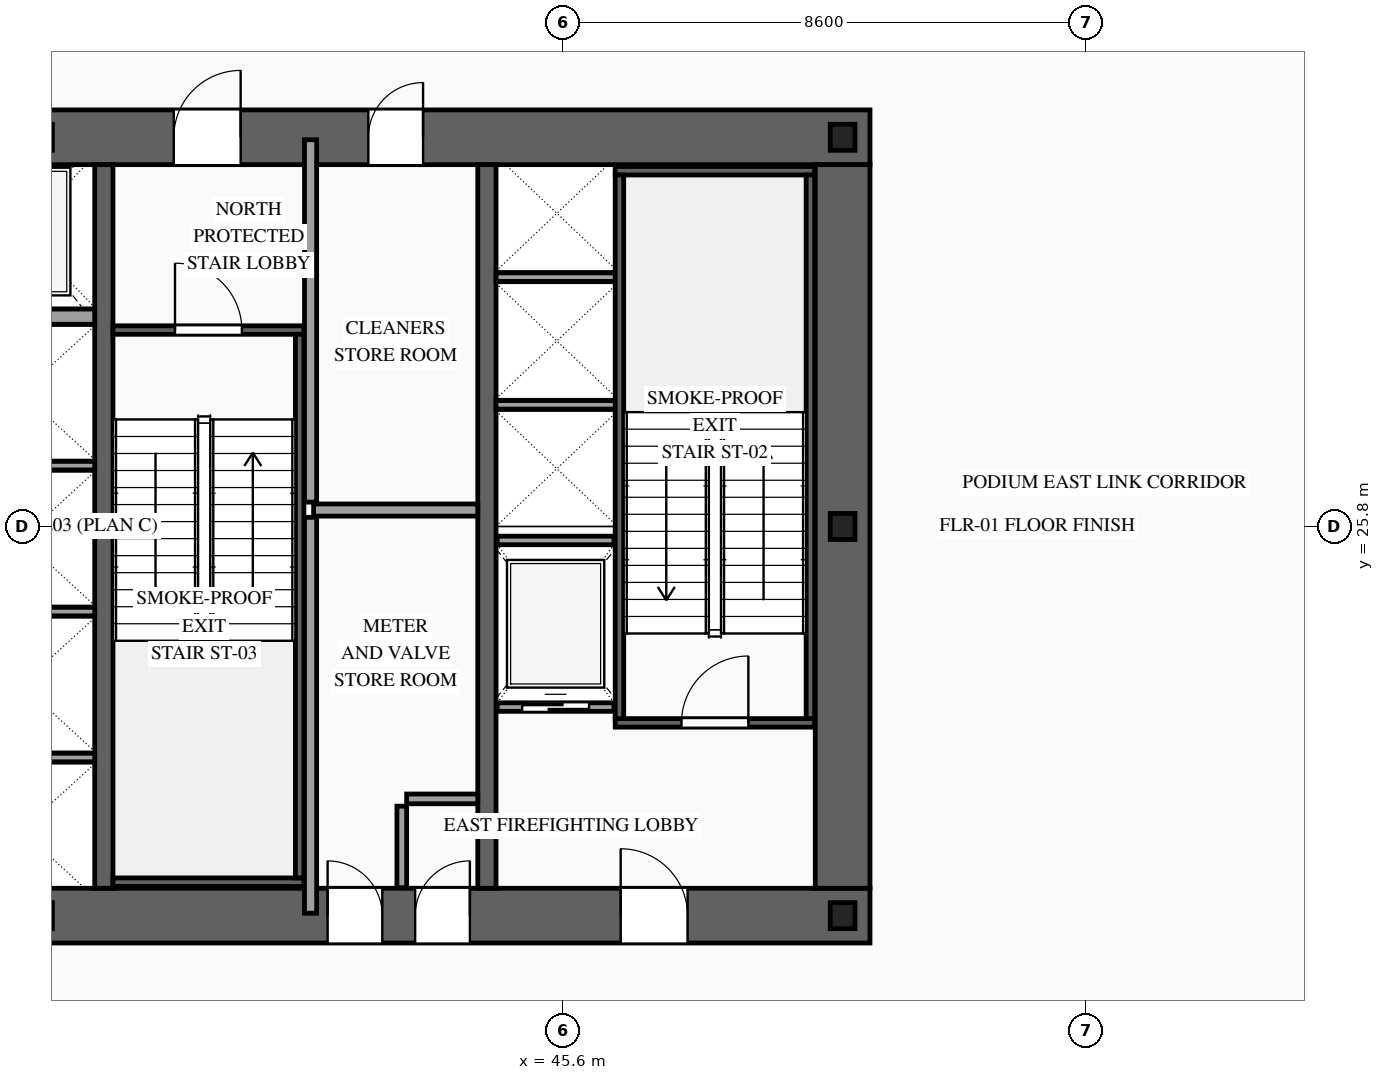
"""IFC4 building model, lengths in metres.
Left out: names, types, materials, properties, quantities, classifications, styles, units other than length and angle.
Written with IfcOpenShell. Run it as: python <this file> out.ifc"""

import sys

from ifc_helpers import new_model, si_unit, direction, frame, frame_2d, origin, origin_2d, place, context, subcontext, project, spatial, rectangle, i_section, extrude, source, transform, mapped, element, fill, save


model = new_model("IFC4")
c1 = context("Model", 3, precision=1e-05, world=origin(), true_north=direction((0.0, 1.0)))
c2 = subcontext(c1, "Body", "Model", "MODEL_VIEW")
j1 = project(units=[si_unit("LENGTHUNIT", "METRE"), si_unit("PLANEANGLEUNIT", "RADIAN")], contexts=[c1])
p1 = place(None, origin())
s1 = spatial("IfcSite", under=j1, at=p1, CompositionType="ELEMENT")
p2 = place(p1, origin())
s2 = spatial("IfcBuilding", under=s1, at=p2, CompositionType="ELEMENT")
p3 = place(p2, frame((0.0, 0.0, 15.0)))
s3 = spatial("IfcBuildingStorey", under=s2, at=p3, CompositionType="ELEMENT", Elevation=15.0)
p4 = place(p3, frame((23.35, 19.4, 0.0), z_axis=(0.0, 0.0, 1.0), x_axis=(1.0, 0.0, 0.0)))
e1 = element("IfcWall", 1, at=p4, inside=s3, PredefinedType="SHEAR", context=c2, shape_type="SweptSolid", body=[
    extrude(rectangle(XDim=27.3, YDim=0.9, at=frame_2d((13.65, 0.0))), origin(), (0.0, 0.0, 1.0), 4.8),
])
p5 = place(p4, frame((2.1, 0.0, 0.0)))
e2 = element("IfcOpeningElement", 2, at=p5, cuts=e1, PredefinedType="OPENING", context=c2, shape_type="SweptSolid", body=[
    extrude(rectangle(XDim=1.1, YDim=2.2, at=frame_2d((0.55, 1.1))), frame((0.0, 0.465, 0.0), z_axis=(0.0, -1.0, 0.0), x_axis=(1.0, 0.0, 0.0)), (0.0, 0.0, 1.0), 0.93),
])
p6 = place(p4, frame((10.0, 0.0, 0.0)))
e3 = element("IfcOpeningElement", 3, at=p6, cuts=e1, PredefinedType="OPENING", context=c2, shape_type="SweptSolid", body=[
    extrude(rectangle(XDim=1.1, YDim=2.2, at=frame_2d((0.55, 1.1))), frame((0.0, 0.465, 0.0), z_axis=(0.0, -1.0, 0.0), x_axis=(1.0, 0.0, 0.0)), (0.0, 0.0, 1.0), 0.93),
])
p7 = place(p4, frame((23.2, 0.0, 0.0)))
e4 = element("IfcOpeningElement", 4, at=p7, cuts=e1, PredefinedType="OPENING", context=c2, shape_type="SweptSolid", body=[
    extrude(rectangle(XDim=1.1, YDim=2.2, at=frame_2d((0.55, 1.1))), frame((0.0, 0.465, 0.0), z_axis=(0.0, -1.0, 0.0), x_axis=(1.0, 0.0, 0.0)), (0.0, 0.0, 1.0), 0.93),
])
p8 = place(p4, frame((19.82, 0.0, 0.0)))
e5 = element("IfcOpeningElement", 5, at=p8, cuts=e1, PredefinedType="OPENING", context=c2, shape_type="SweptSolid", body=[
    extrude(rectangle(XDim=0.9, YDim=2.15, at=frame_2d((0.45, 1.075))), frame((0.0, 0.465, 0.0), z_axis=(0.0, -1.0, 0.0), x_axis=(1.0, 0.0, 0.0)), (0.0, 0.0, 1.0), 0.93),
])
p9 = place(p4, frame((18.38, 0.0, 0.0)))
e6 = element("IfcOpeningElement", 6, at=p9, cuts=e1, PredefinedType="OPENING", context=c2, shape_type="SweptSolid", body=[
    extrude(rectangle(XDim=0.9, YDim=2.15, at=frame_2d((0.45, 1.075))), frame((0.0, 0.465, 0.0), z_axis=(0.0, -1.0, 0.0), x_axis=(1.0, 0.0, 0.0)), (0.0, 0.0, 1.0), 0.93),
])
p10 = place(p3, frame((23.35, 32.2, 0.0), z_axis=(0.0, 0.0, 1.0), x_axis=(1.0, 0.0, 0.0)))
e7 = element("IfcWall", 7, at=p10, inside=s3, PredefinedType="SHEAR", context=c2, shape_type="SweptSolid", body=[
    extrude(rectangle(XDim=27.3, YDim=0.9, at=frame_2d((13.65, 0.0))), origin(), (0.0, 0.0, 1.0), 4.8),
])
p11 = place(p10, frame((4.72, 0.0, 0.0)))
e8 = element("IfcOpeningElement", 8, at=p11, cuts=e7, PredefinedType="OPENING", context=c2, shape_type="SweptSolid", body=[
    extrude(rectangle(XDim=0.9, YDim=2.15, at=frame_2d((0.45, 1.075))), frame((0.0, 0.465, 0.0), z_axis=(0.0, -1.0, 0.0), x_axis=(1.0, 0.0, 0.0)), (0.0, 0.0, 1.0), 0.93),
])
p12 = place(p10, frame((10.0, 0.0, 0.0)))
e9 = element("IfcOpeningElement", 9, at=p12, cuts=e7, PredefinedType="OPENING", context=c2, shape_type="SweptSolid", body=[
    extrude(rectangle(XDim=1.1, YDim=2.2, at=frame_2d((0.55, 1.1))), frame((0.0, 0.465, 0.0), z_axis=(0.0, -1.0, 0.0), x_axis=(1.0, 0.0, 0.0)), (0.0, 0.0, 1.0), 0.93),
])
p13 = place(p10, frame((15.85, 0.0, 0.0)))
e10 = element("IfcOpeningElement", 10, at=p13, cuts=e7, PredefinedType="OPENING", context=c2, shape_type="SweptSolid", body=[
    extrude(rectangle(XDim=1.1, YDim=2.2, at=frame_2d((0.55, 1.1))), frame((0.0, 0.465, 0.0), z_axis=(0.0, -1.0, 0.0), x_axis=(1.0, 0.0, 0.0)), (0.0, 0.0, 1.0), 0.93),
])
p14 = place(p10, frame((19.05, 0.0, 0.0)))
e11 = element("IfcOpeningElement", 11, at=p14, cuts=e7, PredefinedType="OPENING", context=c2, shape_type="SweptSolid", body=[
    extrude(rectangle(XDim=0.9, YDim=2.15, at=frame_2d((0.45, 1.075))), frame((0.0, 0.465, 0.0), z_axis=(0.0, -1.0, 0.0), x_axis=(1.0, 0.0, 0.0)), (0.0, 0.0, 1.0), 0.93),
])
m1 = source(origin(), c2, "Body", "SweptSolid", [
    extrude(rectangle(XDim=11.9, YDim=0.9, at=frame_2d((5.95, 0.0))), origin(), (0.0, 0.0, 1.0), 4.8),
])
p15 = place(p3, frame((50.2, 19.85, 0.0), z_axis=(0.0, 0.0, 1.0), x_axis=(0.0, 1.0, 0.0)))
e12 = element("IfcWall", 12, at=p15, inside=s3, PredefinedType="SHEAR", context=c2, shape_type="MappedRepresentation", body=[
    mapped(m1, transform((0.0, 0.0, 0.0), scale=1.0)),
])
m2 = source(origin(), c2, "Body", "SweptSolid", [
    extrude(rectangle(XDim=11.9, YDim=0.3, at=frame_2d((5.95, 0.0))), origin(), (0.0, 0.0, 1.0), 4.8),
])
for number, where, z_axis, x_axis in (
    (13, (38.05, 19.85, 0.0), (0.0, 0.0, 1.0), (0.0, 1.0, 0.0)),
    (14, (44.35, 19.85, 0.0), (0.0, 0.0, 1.0), (0.0, 1.0, 0.0)),
):
    element("IfcWall", number, at=place(p3, frame(where, z_axis=z_axis, x_axis=x_axis)), inside=s3, PredefinedType="SOLIDWALL", context=c2, shape_type="MappedRepresentation", body=[
        mapped(m2, transform((0.0, 0.0, 0.0), scale=1.0)),
    ])
m3 = source(origin(), c2, "Body", "SweptSolid", [
    extrude(i_section(OverallWidth=0.407, OverallDepth=0.428, WebThickness=0.02, FlangeThickness=0.035, at=origin_2d()), origin(), (0.0, 0.0, 1.0), 4.8),
])
for number, where, z_axis, x_axis in (
    (15, (37.0, 19.4, 0.0), (0.0, 0.0, 1.0), (1.0, 0.0, 0.0)),
    (16, (50.2, 19.4, 0.0), (0.0, 0.0, 1.0), (1.0, 0.0, 0.0)),
    (17, (50.2, 25.8, 0.0), (0.0, 0.0, 1.0), (1.0, 0.0, 0.0)),
    (18, (37.0, 32.2, 0.0), (0.0, 0.0, 1.0), (1.0, 0.0, 0.0)),
    (19, (50.2, 32.2, 0.0), (0.0, 0.0, 1.0), (1.0, 0.0, 0.0)),
):
    element("IfcColumn", number, at=place(p3, frame(where, z_axis=z_axis, x_axis=x_axis)), inside=s3, PredefinedType="COLUMN", context=c2, shape_type="MappedRepresentation", body=[
        mapped(m3, transform((0.0, 0.0, 0.0), scale=1.0)),
    ])
p16 = place(p3, frame((44.52, 22.83, 0.0), z_axis=(0.0, 0.0, 1.0), x_axis=(1.0, 0.0, 0.0)))
e20 = element("IfcWall", 20, at=p16, inside=s3, PredefinedType="SOLIDWALL", context=c2, shape_type="SweptSolid", body=[
    extrude(rectangle(XDim=1.92, YDim=0.14, at=frame_2d((0.96, 0.0))), origin(), (0.0, 0.0, 1.0), 4.52),
])
p17 = place(p16, frame((0.41, 0.0, 0.0)))
e21 = element("IfcOpeningElement", 21, at=p17, cuts=e20, PredefinedType="OPENING", context=c2, shape_type="SweptSolid", body=[
    extrude(rectangle(XDim=1.1, YDim=2.2, at=frame_2d((0.55, 1.1))), frame((0.0, 0.085, 0.0), z_axis=(0.0, -1.0, 0.0), x_axis=(1.0, 0.0, 0.0)), (0.0, 0.0, 1.0), 0.17),
])
m4 = source(origin(), c2, "Body", "SweptSolid", [
    extrude(rectangle(XDim=1.92, YDim=0.14, at=frame_2d((0.96, 0.0))), origin(), (0.0, 0.0, 1.0), 4.52),
])
p18 = place(p3, frame((44.52, 25.57, 0.0), z_axis=(0.0, 0.0, 1.0), x_axis=(1.0, 0.0, 0.0)))
e22 = element("IfcWall", 22, at=p18, inside=s3, PredefinedType="SOLIDWALL", context=c2, shape_type="MappedRepresentation", body=[
    mapped(m4, transform((0.0, 0.0, 0.0), scale=1.0)),
])
m5 = source(origin(), c2, "Body", "SweptSolid", [
    extrude(rectangle(XDim=2.4, YDim=0.14, at=frame_2d((1.2, 0.0))), origin(), (0.0, 0.0, 1.0), 4.52),
])
for number, where, z_axis, x_axis in (
    (23, (35.5, 22.0, 0.0), (0.0, 0.0, 1.0), (1.0, 0.0, 0.0)),
    (24, (35.5, 24.4, 0.0), (0.0, 0.0, 1.0), (1.0, 0.0, 0.0)),
    (25, (35.5, 26.8, 0.0), (0.0, 0.0, 1.0), (1.0, 0.0, 0.0)),
):
    element("IfcWall", number, at=place(p3, frame(where, z_axis=z_axis, x_axis=x_axis)), inside=s3, PredefinedType="SOLIDWALL", context=c2, shape_type="MappedRepresentation", body=[
        mapped(m5, transform((0.0, 0.0, 0.0), scale=1.0)),
    ])
m6 = source(origin(), c2, "Body", "SweptSolid", [
    extrude(rectangle(XDim=2.4, YDim=0.25, at=frame_2d((1.2, 0.0))), origin(), (0.0, 0.0, 1.0), 4.52),
])
p19 = place(p3, frame((35.5, 29.25, 0.0), z_axis=(0.0, 0.0, 1.0), x_axis=(1.0, 0.0, 0.0)))
e26 = element("IfcWall", 26, at=p19, inside=s3, PredefinedType="SOLIDWALL", context=c2, shape_type="MappedRepresentation", body=[
    mapped(m6, transform((0.0, 0.0, 0.0), scale=1.0)),
])
m7 = source(origin(), c2, "Body", "SweptSolid", [
    extrude(rectangle(XDim=2.0, YDim=0.14, at=frame_2d((1.0, 0.0))), origin(), (0.0, 0.0, 1.0), 4.52),
])
for number, where, z_axis, x_axis in (
    (27, (44.5, 27.8, 0.0), (0.0, 0.0, 1.0), (1.0, 0.0, 0.0)),
    (28, (44.5, 29.9, 0.0), (0.0, 0.0, 1.0), (1.0, 0.0, 0.0)),
):
    element("IfcWall", number, at=place(p3, frame(where, z_axis=z_axis, x_axis=x_axis)), inside=s3, PredefinedType="SOLIDWALL", context=c2, shape_type="MappedRepresentation", body=[
        mapped(m7, transform((0.0, 0.0, 0.0), scale=1.0)),
    ])
p20 = place(p3, frame((46.46, 22.57, 0.0), z_axis=(0.0, 0.0, 1.0), x_axis=(1.0, 0.0, 0.0)))
e29 = element("IfcWall", 29, at=p20, inside=s3, PredefinedType="SOLIDWALL", context=c2, shape_type="SweptSolid", body=[
    extrude(rectangle(XDim=3.28, YDim=0.14, at=frame_2d((1.64, 0.0))), origin(), (0.0, 0.0, 1.0), 4.52),
])
p21 = place(p20, frame((1.09, 0.0, 0.0)))
e30 = element("IfcOpeningElement", 30, at=p21, cuts=e29, PredefinedType="OPENING", context=c2, shape_type="SweptSolid", body=[
    extrude(rectangle(XDim=1.1, YDim=2.2, at=frame_2d((0.55, 1.1))), frame((0.0, 0.085, 0.0), z_axis=(0.0, -1.0, 0.0), x_axis=(1.0, 0.0, 0.0)), (0.0, 0.0, 1.0), 0.17),
])
m8 = source(origin(), c2, "Body", "SweptSolid", [
    extrude(rectangle(XDim=3.28, YDim=0.14, at=frame_2d((1.64, 0.0))), origin(), (0.0, 0.0, 1.0), 4.52),
])
p22 = place(p3, frame((46.46, 31.65, 0.0), z_axis=(0.0, 0.0, 1.0), x_axis=(1.0, 0.0, 0.0)))
e31 = element("IfcWall", 31, at=p22, inside=s3, PredefinedType="SOLIDWALL", context=c2, shape_type="MappedRepresentation", body=[
    mapped(m8, transform((0.0, 0.0, 0.0), scale=1.0)),
])
m9 = source(origin(), c2, "Body", "SweptSolid", [
    extrude(rectangle(XDim=8.94, YDim=0.14, at=frame_2d((4.47, 0.0))), origin(), (0.0, 0.0, 1.0), 4.52),
])
for number, where, z_axis, x_axis in (
    (32, (46.53, 22.64, 0.0), (0.0, 0.0, 1.0), (0.0, 1.0, 0.0)),
    (33, (49.67, 22.64, 0.0), (0.0, 0.0, 1.0), (0.0, 1.0, 0.0)),
):
    element("IfcWall", number, at=place(p3, frame(where, z_axis=z_axis, x_axis=x_axis)), inside=s3, PredefinedType="SOLIDWALL", context=c2, shape_type="MappedRepresentation", body=[
        mapped(m9, transform((0.0, 0.0, 0.0), scale=1.0)),
    ])
p23 = place(p3, frame((38.2, 29.03, 0.0), z_axis=(0.0, 0.0, 1.0), x_axis=(1.0, 0.0, 0.0)))
e34 = element("IfcWall", 34, at=p23, inside=s3, PredefinedType="SOLIDWALL", context=c2, shape_type="SweptSolid", body=[
    extrude(rectangle(XDim=3.14, YDim=0.14, at=frame_2d((1.57, 0.0))), origin(), (0.0, 0.0, 1.0), 4.52),
])
p24 = place(p23, frame((1.02, 0.0, 0.0)))
e35 = element("IfcOpeningElement", 35, at=p24, cuts=e34, PredefinedType="OPENING", context=c2, shape_type="SweptSolid", body=[
    extrude(rectangle(XDim=1.1, YDim=2.2, at=frame_2d((0.55, 1.1))), frame((0.0, 0.085, 0.0), z_axis=(0.0, -1.0, 0.0), x_axis=(1.0, 0.0, 0.0)), (0.0, 0.0, 1.0), 0.17),
])
m10 = source(origin(), c2, "Body", "SweptSolid", [
    extrude(rectangle(XDim=3.14, YDim=0.14, at=frame_2d((1.57, 0.0))), origin(), (0.0, 0.0, 1.0), 4.52),
])
p25 = place(p3, frame((38.2, 19.95, 0.0), z_axis=(0.0, 0.0, 1.0), x_axis=(1.0, 0.0, 0.0)))
e36 = element("IfcWall", 36, at=p25, inside=s3, PredefinedType="SOLIDWALL", context=c2, shape_type="MappedRepresentation", body=[
    mapped(m10, transform((0.0, 0.0, 0.0), scale=1.0)),
])
m11 = source(origin(), c2, "Body", "SweptSolid", [
    extrude(rectangle(XDim=8.94, YDim=0.14, at=frame_2d((4.47, 0.0))), origin(), (0.0, 0.0, 1.0), 4.52),
])
p26 = place(p3, frame((41.27, 20.02, 0.0), z_axis=(0.0, 0.0, 1.0), x_axis=(0.0, 1.0, 0.0)))
e37 = element("IfcWall", 37, at=p26, inside=s3, PredefinedType="SOLIDWALL", context=c2, shape_type="MappedRepresentation", body=[
    mapped(m11, transform((0.0, 0.0, 0.0), scale=1.0)),
])
m12 = source(origin(), c2, "Body", "SweptSolid", [
    extrude(rectangle(XDim=1.34, YDim=0.16, at=frame_2d((0.67, 0.0))), origin(), (0.0, 0.0, 1.0), 4.52),
])
p27 = place(p3, frame((42.95, 19.86, 0.0), z_axis=(0.0, 0.0, 1.0), x_axis=(0.0, 1.0, 0.0)))
e38 = element("IfcWall", 38, at=p27, inside=s3, PredefinedType="PARTITIONING", context=c2, shape_type="MappedRepresentation", body=[
    mapped(m12, transform((0.0, 0.0, 0.0), scale=1.0)),
])
m13 = source(origin(), c2, "Body", "SweptSolid", [
    extrude(rectangle(XDim=1.17, YDim=0.16, at=frame_2d((0.585, 0.0))), origin(), (0.0, 0.0, 1.0), 4.52),
])
p28 = place(p3, frame((43.03, 21.32, 0.0), z_axis=(0.0, 0.0, 1.0), x_axis=(1.0, 0.0, 0.0)))
e39 = element("IfcWall", 39, at=p28, inside=s3, PredefinedType="PARTITIONING", context=c2, shape_type="MappedRepresentation", body=[
    mapped(m13, transform((0.0, 0.0, 0.0), scale=1.0)),
])
m14 = source(origin(), c2, "Body", "SweptSolid", [
    extrude(rectangle(XDim=6.51, YDim=0.2, at=frame_2d((3.255, 0.0))), origin(), (0.0, 0.0, 1.0), 4.52),
])
p29 = place(p3, frame((41.45, 19.44, 0.0), z_axis=(0.0, 0.0, 1.0), x_axis=(0.0, 1.0, 0.0)))
e40 = element("IfcWall", 40, at=p29, inside=s3, PredefinedType="PARTITIONING", context=c2, shape_type="MappedRepresentation", body=[
    mapped(m14, transform((0.0, 0.0, 0.0), scale=1.0)),
])
m15 = source(origin(), c2, "Body", "SweptSolid", [
    extrude(rectangle(XDim=2.7, YDim=0.2, at=frame_2d((1.35, 0.0))), origin(), (0.0, 0.0, 1.0), 4.52),
])
p30 = place(p3, frame((41.5, 26.07, 0.0), z_axis=(0.0, 0.0, 1.0), x_axis=(1.0, 0.0, 0.0)))
e41 = element("IfcWall", 41, at=p30, inside=s3, PredefinedType="PARTITIONING", context=c2, shape_type="MappedRepresentation", body=[
    mapped(m15, transform((0.0, 0.0, 0.0), scale=1.0)),
])
m16 = source(origin(), c2, "Body", "SweptSolid", [
    extrude(rectangle(XDim=5.96, YDim=0.2, at=frame_2d((2.98, 0.0))), origin(), (0.0, 0.0, 1.0), 4.52),
])
p31 = place(p3, frame((41.45, 26.2, 0.0), z_axis=(0.0, 0.0, 1.0), x_axis=(0.0, 1.0, 0.0)))
e42 = element("IfcWall", 42, at=p31, inside=s3, PredefinedType="PARTITIONING", context=c2, shape_type="MappedRepresentation", body=[
    mapped(m16, transform((0.0, 0.0, 0.0), scale=1.0)),
])
m17 = source(origin(), c2, "Body", "SweptSolid", [
    extrude(rectangle(XDim=1.1, YDim=2.2, at=frame_2d((0.55, 1.1))), frame((0.0, 0.025, 0.0), z_axis=(0.0, -1.0, 0.0), x_axis=(1.0, 0.0, 0.0)), (0.0, 0.0, 1.0), 0.05),
])
p32 = place(p17, origin())
e43 = element("IfcDoor", 43, at=p32, inside=s3, OperationType="SLIDING_TO_RIGHT", PredefinedType="DOOR", context=c2, shape_type="MappedRepresentation", body=[
    mapped(m17, transform((0.0, 0.0, 0.0), scale=1.0)),
])
fill(e21, e43)
m18 = source(origin(), c2, "Body", "SweptSolid", [
    extrude(rectangle(XDim=1.1, YDim=2.2, at=frame_2d((0.55, 1.1))), frame((0.0, 0.025, 0.0), z_axis=(0.0, -1.0, 0.0), x_axis=(1.0, 0.0, 0.0)), (0.0, 0.0, 1.0), 0.05),
])
p33 = place(p21, origin())
e44 = element("IfcDoor", 44, at=p33, inside=s3, OperationType="SINGLE_SWING_RIGHT", PredefinedType="DOOR", context=c2, shape_type="MappedRepresentation", body=[
    mapped(m18, transform((0.0, 0.0, 0.0), scale=1.0)),
])
fill(e30, e44)
p34 = place(p24, origin())
e45 = element("IfcDoor", 45, at=p34, inside=s3, OperationType="SINGLE_SWING_LEFT", PredefinedType="DOOR", context=c2, shape_type="MappedRepresentation", body=[
    mapped(m18, transform((0.0, 0.0, 0.0), scale=1.0)),
])
fill(e35, e45)
p35 = place(p7, origin())
e46 = element("IfcDoor", 46, at=p35, inside=s3, OperationType="SINGLE_SWING_LEFT", PredefinedType="DOOR", context=c2, shape_type="MappedRepresentation", body=[
    mapped(m18, transform((0.0, 0.0, 0.0), scale=1.0)),
])
fill(e4, e46)
p36 = place(p13, origin())
e47 = element("IfcDoor", 47, at=p36, inside=s3, OperationType="SINGLE_SWING_RIGHT", PredefinedType="DOOR", context=c2, shape_type="MappedRepresentation", body=[
    mapped(m18, transform((0.0, 0.0, 0.0), scale=1.0)),
])
fill(e10, e47)
m19 = source(origin(), c2, "Body", "SweptSolid", [
    extrude(rectangle(XDim=0.9, YDim=2.15, at=frame_2d((0.45, 1.075))), frame((0.0, 0.025, 0.0), z_axis=(0.0, -1.0, 0.0), x_axis=(1.0, 0.0, 0.0)), (0.0, 0.0, 1.0), 0.05),
])
p37 = place(p8, origin())
e48 = element("IfcDoor", 48, at=p37, inside=s3, OperationType="SINGLE_SWING_RIGHT", PredefinedType="DOOR", context=c2, shape_type="MappedRepresentation", body=[
    mapped(m19, transform((0.0, 0.0, 0.0), scale=1.0)),
])
fill(e5, e48)
p38 = place(p9, origin())
e49 = element("IfcDoor", 49, at=p38, inside=s3, OperationType="SINGLE_SWING_LEFT", PredefinedType="DOOR", context=c2, shape_type="MappedRepresentation", body=[
    mapped(m19, transform((0.0, 0.0, 0.0), scale=1.0)),
])
fill(e6, e49)
p39 = place(p14, origin())
e50 = element("IfcDoor", 50, at=p39, inside=s3, OperationType="SINGLE_SWING_RIGHT", PredefinedType="DOOR", context=c2, shape_type="MappedRepresentation", body=[
    mapped(m19, transform((0.0, 0.0, 0.0), scale=1.0)),
])
fill(e11, e50)
save(model, sys.argv[1])
